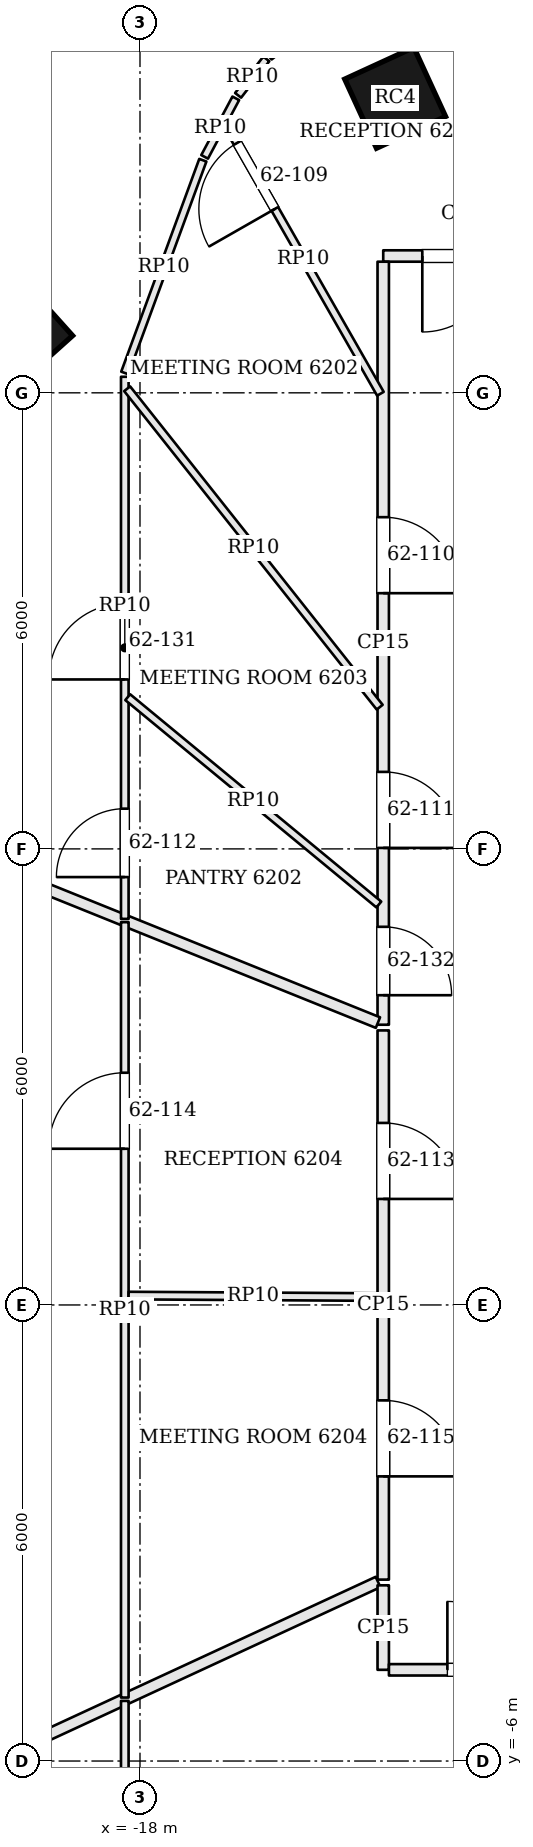
"""IFC4 building model, lengths in metres.
Left out: names, types, materials, properties, quantities, classifications, styles, units other than length and angle.
Written with IfcOpenShell. Run it as: python <this file> out.ifc"""

import sys

from ifc_helpers import new_model, si_unit, direction, frame, frame_2d, origin, origin_2d, place, context, subcontext, project, spatial, rectangle, extrude, element, fill, save


model = new_model("IFC4")
c1 = context("Model", 3, precision=1e-05, world=origin(), true_north=direction((0.0, 1.0)))
c2 = subcontext(c1, "Body", "Model", "MODEL_VIEW")
j1 = project(units=[si_unit("LENGTHUNIT", "METRE"), si_unit("PLANEANGLEUNIT", "RADIAN")], contexts=[c1])
p1 = place(None, origin())
s1 = spatial("IfcSite", under=j1, at=p1, CompositionType="ELEMENT")
p2 = place(p1, origin())
s2 = spatial("IfcBuilding", under=s1, at=p2, CompositionType="ELEMENT")
p3 = place(p2, frame((0.0, 0.0, 252.6)))
s3 = spatial("IfcBuildingStorey", under=s2, at=p3, CompositionType="ELEMENT", Elevation=252.6)
for number, where, z_axis, x_axis in (
    (1, (-14.643, 15.881, 0.0), (0.0, 0.0, 1.0), (-0.909, -0.417, 0.0)),
    (2, (-19.593, 12.79, 0.0), (0.0, 0.0, 1.0), (-0.744, -0.668, 0.0)),
):
    element("IfcColumn", number, at=place(p3, frame(where, z_axis=z_axis, x_axis=x_axis)), inside=s3, PredefinedType="COLUMN", context=c2, shape_type="SweptSolid", body=[
        extrude(rectangle(XDim=1.0, YDim=1.0, at=origin_2d()), origin(), (0.0, 0.0, 1.0), 3.9),
    ])
p4 = place(p3, frame((-18.767, 18.854, 0.0), z_axis=(0.0, 0.0, 1.0), x_axis=(-0.474475888716, -0.880268499395, 0.0)))
e3 = element("IfcWall", 3, at=p4, inside=s3, PredefinedType="SOLIDWALL", context=c2, shape_type="SweptSolid", body=[
    extrude(rectangle(XDim=4.219, YDim=0.45, at=frame_2d((2.11, 0.0))), origin(), (0.0, 0.0, 1.0), 3.7),
])
p5 = place(p4, frame((1.06, 0.0, 0.9)))
e4 = element("IfcOpeningElement", 4, at=p5, cuts=e3, PredefinedType="OPENING", context=c2, shape_type="SweptSolid", body=[
    extrude(rectangle(XDim=2.1, YDim=2.3, at=frame_2d((1.05, 1.15))), frame((0.0, 0.235, 0.0), z_axis=(0.0, -1.0, 0.0), x_axis=(1.0, 0.0, 0.0)), (0.0, 0.0, 1.0), 0.47),
])
p6 = place(p3, frame((-18.896, 18.773, 3.9), z_axis=(0.0, 0.0, 1.0), x_axis=(-0.474444905835, -0.880285198857, 0.0)))
e5 = element("IfcWall", 5, at=p6, inside=s3, PredefinedType="PARAPET", context=c2, shape_type="SweptSolid", body=[
    extrude(rectangle(XDim=4.05, YDim=0.3, at=frame_2d((2.025, 0.0))), origin(), (0.0, 0.0, 1.0), 1.1),
])
p7 = place(p3, frame((-14.976, 20.153, 0.0), z_axis=(0.0, 0.0, 1.0), x_axis=(0.361720652029, -0.932286527788, 0.0)))
e6 = element("IfcWall", 6, at=p7, inside=s3, PredefinedType="PARTITIONING", context=c2, shape_type="SweptSolid", body=[
    extrude(rectangle(XDim=6.739, YDim=0.15, at=frame_2d((3.37, 0.0))), origin(), (0.0, 0.0, 1.0), 3.084),
])
p8 = place(p3, frame((-12.586, 13.8, 0.0), z_axis=(0.0, 0.0, 1.0), x_axis=(-1.0, 0.0, 0.0)))
e7 = element("IfcWall", 7, at=p8, inside=s3, PredefinedType="PARTITIONING", context=c2, shape_type="SweptSolid", body=[
    extrude(rectangle(XDim=2.214, YDim=0.15, at=frame_2d((1.107, 0.0))), origin(), (0.0, 0.0, 1.0), 3.084),
])
p9 = place(p8, frame((0.7, 0.0, 0.0)))
e8 = element("IfcOpeningElement", 8, at=p9, cuts=e7, PredefinedType="OPENING", context=c2, shape_type="SweptSolid", body=[
    extrude(rectangle(XDim=1.0, YDim=2.1, at=frame_2d((0.5, 1.05))), frame((0.0, 0.085, 0.0), z_axis=(0.0, -1.0, 0.0), x_axis=(1.0, 0.0, 0.0)), (0.0, 0.0, 1.0), 0.17),
])
p10 = place(p3, frame((-14.8, 13.725, 0.0), z_axis=(0.0, 0.0, 1.0), x_axis=(0.0, -1.0, 0.0)))
e9 = element("IfcWall", 9, at=p10, inside=s3, PredefinedType="PARTITIONING", context=c2, shape_type="SweptSolid", body=[
    extrude(rectangle(XDim=10.038, YDim=0.15, at=frame_2d((5.019, 0.0))), origin(), (0.0, 0.0, 1.0), 3.084),
])
p11 = place(p10, frame((3.361, 0.0, 0.0)))
e10 = element("IfcOpeningElement", 10, at=p11, cuts=e9, PredefinedType="OPENING", context=c2, shape_type="SweptSolid", body=[
    extrude(rectangle(XDim=1.0, YDim=2.4, at=frame_2d((0.5, 1.2))), frame((0.0, 0.085, 0.0), z_axis=(0.0, -1.0, 0.0), x_axis=(1.0, 0.0, 0.0)), (0.0, 0.0, 1.0), 0.17),
])
p12 = place(p10, frame((6.712, 0.0, 0.0)))
e11 = element("IfcOpeningElement", 11, at=p12, cuts=e9, PredefinedType="OPENING", context=c2, shape_type="SweptSolid", body=[
    extrude(rectangle(XDim=1.0, YDim=2.4, at=frame_2d((0.5, 1.2))), frame((0.0, 0.085, 0.0), z_axis=(0.0, -1.0, 0.0), x_axis=(1.0, 0.0, 0.0)), (0.0, 0.0, 1.0), 0.17),
])
p13 = place(p10, frame((8.75, 0.0, 0.0)))
e12 = element("IfcOpeningElement", 12, at=p13, cuts=e9, PredefinedType="OPENING", context=c2, shape_type="SweptSolid", body=[
    extrude(rectangle(XDim=0.9, YDim=2.1, at=frame_2d((0.45, 1.05))), frame((0.0, 0.085, 0.0), z_axis=(0.0, -1.0, 0.0), x_axis=(1.0, 0.0, 0.0)), (0.0, 0.0, 1.0), 0.17),
])
p14 = place(p3, frame((-25.486, 7.995, 0.0), z_axis=(0.0, 0.0, 1.0), x_axis=(0.927462708684, -0.373915664289, 0.0)))
e13 = element("IfcWall", 13, at=p14, inside=s3, PredefinedType="PARTITIONING", context=c2, shape_type="SweptSolid", body=[
    extrude(rectangle(XDim=11.447, YDim=0.15, at=frame_2d((5.723, 0.0))), origin(), (0.0, 0.0, 1.0), 3.084),
])
p15 = place(p3, frame((-14.8, 3.612, 0.0), z_axis=(0.0, 0.0, 1.0), x_axis=(0.0, -1.0, 0.0)))
e14 = element("IfcWall", 14, at=p15, inside=s3, PredefinedType="PARTITIONING", context=c2, shape_type="SweptSolid", body=[
    extrude(rectangle(XDim=7.225, YDim=0.15, at=frame_2d((3.613, 0.0))), origin(), (0.0, 0.0, 1.0), 3.084),
])
p16 = place(p15, frame((1.217, 0.0, 0.0)))
e15 = element("IfcOpeningElement", 15, at=p16, cuts=e14, PredefinedType="OPENING", context=c2, shape_type="SweptSolid", body=[
    extrude(rectangle(XDim=1.0, YDim=2.1, at=frame_2d((0.5, 1.05))), frame((0.0, 0.085, 0.0), z_axis=(0.0, -1.0, 0.0), x_axis=(1.0, 0.0, 0.0)), (0.0, 0.0, 1.0), 0.17),
])
p17 = place(p15, frame((4.867, 0.0, 0.0)))
e16 = element("IfcOpeningElement", 16, at=p17, cuts=e14, PredefinedType="OPENING", context=c2, shape_type="SweptSolid", body=[
    extrude(rectangle(XDim=1.0, YDim=2.4, at=frame_2d((0.5, 1.2))), frame((0.0, 0.085, 0.0), z_axis=(0.0, -1.0, 0.0), x_axis=(1.0, 0.0, 0.0)), (0.0, 0.0, 1.0), 0.17),
])
p18 = place(p3, frame((-24.363, -8.04, 0.0), z_axis=(0.0, 0.0, 1.0), x_axis=(0.907507429398, 0.420036028916, 0.0)))
e17 = element("IfcWall", 17, at=p18, inside=s3, PredefinedType="PARTITIONING", context=c2, shape_type="SweptSolid", body=[
    extrude(rectangle(XDim=10.463, YDim=0.15, at=frame_2d((5.231, 0.0))), origin(), (0.0, 0.0, 1.0), 3.084),
])
p19 = place(p3, frame((-14.8, -3.688, 0.0), z_axis=(0.0, 0.0, 1.0), x_axis=(0.0, -1.0, 0.0)))
e18 = element("IfcWall", 18, at=p19, inside=s3, PredefinedType="PARTITIONING", context=c2, shape_type="SweptSolid", body=[
    extrude(rectangle(XDim=1.112, YDim=0.15, at=frame_2d((0.556, 0.0))), origin(), (0.0, 0.0, 1.0), 3.084),
])
p20 = place(p3, frame((-14.725, -4.8, 0.0), z_axis=(0.0, 0.0, 1.0), x_axis=(1.0, 0.0, 0.0)))
e19 = element("IfcWall", 19, at=p20, inside=s3, PredefinedType="PARTITIONING", context=c2, shape_type="SweptSolid", body=[
    extrude(rectangle(XDim=4.6, YDim=0.15, at=frame_2d((2.3, 0.0))), origin(), (0.0, 0.0, 1.0), 3.084),
])
p21 = place(p20, frame((0.769, 0.0, 0.0)))
e20 = element("IfcOpeningElement", 20, at=p21, cuts=e19, PredefinedType="OPENING", context=c2, shape_type="SweptSolid", body=[
    extrude(rectangle(XDim=1.8, YDim=2.1, at=frame_2d((0.9, 1.05))), frame((0.0, 0.085, 0.0), z_axis=(0.0, -1.0, 0.0), x_axis=(1.0, 0.0, 0.0)), (0.0, 0.0, 1.0), 0.17),
])
p22 = place(p3, frame((-14.1, -13.319, 0.0), z_axis=(0.0, 0.0, 1.0), x_axis=(0.422849635533, 0.906199859705, 0.0)))
e21 = element("IfcWall", 21, at=p22, inside=s3, PredefinedType="PARTITIONING", context=c2, shape_type="SweptSolid", body=[
    extrude(rectangle(XDim=9.326, YDim=0.15, at=frame_2d((4.663, 0.0))), origin(), (0.0, 0.0, 1.0), 3.084),
])
p23 = place(p3, frame((-18.2, 12.261, 0.0), z_axis=(0.0, 0.0, 1.0), x_axis=(0.344384562173, 0.938828670917, 0.0)))
e22 = element("IfcWall", 22, at=p23, inside=s3, PredefinedType="PARTITIONING", context=c2, shape_type="SweptSolid", body=[
    extrude(rectangle(XDim=2.982, YDim=0.1, at=frame_2d((1.491, 0.0))), origin(), (0.0, 0.0, 1.0), 3.084),
])
p24 = place(p3, frame((-17.15, 15.104, 0.0), z_axis=(0.0, 0.0, 1.0), x_axis=(0.46990536129, 0.882716801376, 0.0)))
e23 = element("IfcWall", 23, at=p24, inside=s3, PredefinedType="PARTITIONING", context=c2, shape_type="SweptSolid", body=[
    extrude(rectangle(XDim=0.872, YDim=0.1, at=frame_2d((0.436, 0.0))), origin(), (0.0, 0.0, 1.0), 3.084),
])
p25 = place(p3, frame((-16.709, 15.914, 0.0), z_axis=(0.0, 0.0, 1.0), x_axis=(0.612181321454, 0.790717414544, 0.0)))
e24 = element("IfcWall", 24, at=p25, inside=s3, PredefinedType="PARTITIONING", context=c2, shape_type="SweptSolid", body=[
    extrude(rectangle(XDim=0.606, YDim=0.1, at=frame_2d((0.303, 0.0))), origin(), (0.0, 0.0, 1.0), 3.084),
])
p26 = place(p3, frame((-16.3, 16.424, 0.0), z_axis=(0.0, 0.0, 1.0), x_axis=(0.777836101026, 0.628467182867, 0.0)))
e25 = element("IfcWall", 25, at=p26, inside=s3, PredefinedType="PARTITIONING", context=c2, shape_type="SweptSolid", body=[
    extrude(rectangle(XDim=0.48, YDim=0.1, at=frame_2d((0.24, 0.0))), origin(), (0.0, 0.0, 1.0), 3.084),
])
p27 = place(p3, frame((-18.2, 5.079, 0.0), z_axis=(0.0, 0.0, 1.0), x_axis=(0.0, 1.0, 0.0)))
e26 = element("IfcWall", 26, at=p27, inside=s3, PredefinedType="PARTITIONING", context=c2, shape_type="SweptSolid", body=[
    extrude(rectangle(XDim=7.132, YDim=0.1, at=frame_2d((3.566, 0.0))), origin(), (0.0, 0.0, 1.0), 3.084),
])
p28 = place(p27, frame((0.55, 0.0, 0.0)))
e27 = element("IfcOpeningElement", 27, at=p28, cuts=e26, PredefinedType="OPENING", context=c2, shape_type="SweptSolid", body=[
    extrude(rectangle(XDim=0.9, YDim=2.1, at=frame_2d((0.45, 1.05))), frame((0.0, 0.06, 0.0), z_axis=(0.0, -1.0, 0.0), x_axis=(1.0, 0.0, 0.0)), (0.0, 0.0, 1.0), 0.12),
])
p29 = place(p27, frame((3.15, 0.0, 0.0)))
e28 = element("IfcOpeningElement", 28, at=p29, cuts=e26, PredefinedType="OPENING", context=c2, shape_type="SweptSolid", body=[
    extrude(rectangle(XDim=1.0, YDim=2.4, at=frame_2d((0.5, 1.2))), frame((0.0, 0.06, 0.0), z_axis=(0.0, -1.0, 0.0), x_axis=(1.0, 0.0, 0.0)), (0.0, 0.0, 1.0), 0.12),
])
p30 = place(p3, frame((-14.837, 11.988, 0.0), z_axis=(0.0, 0.0, 1.0), x_axis=(-0.495920621108, 0.868367858433, 0.0)))
e29 = element("IfcWall", 29, at=p30, inside=s3, PredefinedType="PARTITIONING", context=c2, shape_type="SweptSolid", body=[
    extrude(rectangle(XDim=4.095, YDim=0.1, at=frame_2d((2.047, 0.0))), origin(), (0.0, 0.0, 1.0), 3.084),
])
p31 = place(p30, frame((2.8, 0.0, 0.0)))
e30 = element("IfcOpeningElement", 30, at=p31, cuts=e29, PredefinedType="OPENING", context=c2, shape_type="SweptSolid", body=[
    extrude(rectangle(XDim=1.0, YDim=2.4, at=frame_2d((0.5, 1.2))), frame((0.0, 0.06, 0.0), z_axis=(0.0, -1.0, 0.0), x_axis=(1.0, 0.0, 0.0)), (0.0, 0.0, 1.0), 0.12),
])
p32 = place(p3, frame((-14.847, 7.864, 0.0), z_axis=(0.0, 0.0, 1.0), x_axis=(-0.62137054643, 0.783516843488, 0.0)))
e31 = element("IfcWall", 31, at=p32, inside=s3, PredefinedType="PARTITIONING", context=c2, shape_type="SweptSolid", body=[
    extrude(rectangle(XDim=5.347, YDim=0.1, at=frame_2d((2.673, 0.0))), origin(), (0.0, 0.0, 1.0), 3.084),
])
p33 = place(p3, frame((-14.858, 5.268, 0.0), z_axis=(0.0, 0.0, 1.0), x_axis=(-0.771123538213, 0.636685549399, 0.0)))
e32 = element("IfcWall", 32, at=p33, inside=s3, PredefinedType="PARTITIONING", context=c2, shape_type="SweptSolid", body=[
    extrude(rectangle(XDim=4.284, YDim=0.1, at=frame_2d((2.142, 0.0))), origin(), (0.0, 0.0, 1.0), 3.084),
])
p34 = place(p3, frame((-18.2, -5.165, 0.0), z_axis=(0.0, 0.0, 1.0), x_axis=(0.0, 1.0, 0.0)))
e33 = element("IfcWall", 33, at=p34, inside=s3, PredefinedType="PARTITIONING", context=c2, shape_type="SweptSolid", body=[
    extrude(rectangle(XDim=10.201, YDim=0.1, at=frame_2d((5.1, 0.0))), origin(), (0.0, 0.0, 1.0), 3.084),
])
p35 = place(p34, frame((7.22, 0.0, 0.0)))
e34 = element("IfcOpeningElement", 34, at=p35, cuts=e33, PredefinedType="OPENING", context=c2, shape_type="SweptSolid", body=[
    extrude(rectangle(XDim=1.0, YDim=2.1, at=frame_2d((0.5, 1.05))), frame((0.0, 0.06, 0.0), z_axis=(0.0, -1.0, 0.0), x_axis=(1.0, 0.0, 0.0)), (0.0, 0.0, 1.0), 0.12),
])
p36 = place(p3, frame((-14.875, 0.104, 0.0), z_axis=(0.0, 0.0, 1.0), x_axis=(-0.999982216314, 0.005963812234, 0.0)))
e35 = element("IfcWall", 35, at=p36, inside=s3, PredefinedType="PARTITIONING", context=c2, shape_type="SweptSolid", body=[
    extrude(rectangle(XDim=3.275, YDim=0.1, at=frame_2d((1.637, 0.0))), origin(), (0.0, 0.0, 1.0), 3.084),
])
p37 = place(p3, frame((-18.2, -8.15, 0.0), z_axis=(0.0, 0.0, 1.0), x_axis=(0.0, 1.0, 0.0)))
e36 = element("IfcWall", 36, at=p37, inside=s3, PredefinedType="PARTITIONING", context=c2, shape_type="SweptSolid", body=[
    extrude(rectangle(XDim=2.941, YDim=0.1, at=frame_2d((1.47, 0.0))), origin(), (0.0, 0.0, 1.0), 3.084),
])
p38 = place(p9, origin())
e37 = element("IfcDoor", 37, at=p38, inside=s3, OperationType="SINGLE_SWING_RIGHT", PredefinedType="DOOR", context=c2, shape_type="SweptSolid", body=[
    extrude(rectangle(XDim=1.0, YDim=2.1, at=frame_2d((0.5, 1.05))), frame((0.0, 0.025, 0.0), z_axis=(0.0, -1.0, 0.0), x_axis=(1.0, 0.0, 0.0)), (0.0, 0.0, 1.0), 0.05),
])
fill(e8, e37)
p39 = place(p31, origin())
e38 = element("IfcDoor", 38, at=p39, inside=s3, OperationType="SINGLE_SWING_LEFT", PredefinedType="DOOR", context=c2, shape_type="SweptSolid", body=[
    extrude(rectangle(XDim=1.0, YDim=2.4, at=frame_2d((0.5, 1.2))), frame((0.0, 0.025, 0.0), z_axis=(0.0, -1.0, 0.0), x_axis=(1.0, 0.0, 0.0)), (0.0, 0.0, 1.0), 0.05),
])
fill(e30, e38)
p40 = place(p11, origin())
e39 = element("IfcDoor", 39, at=p40, inside=s3, OperationType="SINGLE_SWING_RIGHT", PredefinedType="DOOR", context=c2, shape_type="SweptSolid", body=[
    extrude(rectangle(XDim=1.0, YDim=2.4, at=frame_2d((0.5, 1.2))), frame((0.0, 0.025, 0.0), z_axis=(0.0, -1.0, 0.0), x_axis=(1.0, 0.0, 0.0)), (0.0, 0.0, 1.0), 0.05),
])
fill(e10, e39)
p41 = place(p12, origin())
e40 = element("IfcDoor", 40, at=p41, inside=s3, OperationType="SINGLE_SWING_RIGHT", PredefinedType="DOOR", context=c2, shape_type="SweptSolid", body=[
    extrude(rectangle(XDim=1.0, YDim=2.4, at=frame_2d((0.5, 1.2))), frame((0.0, 0.025, 0.0), z_axis=(0.0, -1.0, 0.0), x_axis=(1.0, 0.0, 0.0)), (0.0, 0.0, 1.0), 0.05),
])
fill(e11, e40)
p42 = place(p28, origin())
e41 = element("IfcDoor", 41, at=p42, inside=s3, OperationType="SINGLE_SWING_LEFT", PredefinedType="DOOR", context=c2, shape_type="SweptSolid", body=[
    extrude(rectangle(XDim=0.9, YDim=2.1, at=frame_2d((0.45, 1.05))), frame((0.0, 0.025, 0.0), z_axis=(0.0, -1.0, 0.0), x_axis=(1.0, 0.0, 0.0)), (0.0, 0.0, 1.0), 0.05),
])
fill(e27, e41)
p43 = place(p16, origin())
e42 = element("IfcDoor", 42, at=p43, inside=s3, OperationType="SINGLE_SWING_RIGHT", PredefinedType="DOOR", context=c2, shape_type="SweptSolid", body=[
    extrude(rectangle(XDim=1.0, YDim=2.1, at=frame_2d((0.5, 1.05))), frame((0.0, 0.025, 0.0), z_axis=(0.0, -1.0, 0.0), x_axis=(1.0, 0.0, 0.0)), (0.0, 0.0, 1.0), 0.05),
])
fill(e15, e42)
p44 = place(p35, origin())
e43 = element("IfcDoor", 43, at=p44, inside=s3, OperationType="SINGLE_SWING_LEFT", PredefinedType="DOOR", context=c2, shape_type="SweptSolid", body=[
    extrude(rectangle(XDim=1.0, YDim=2.1, at=frame_2d((0.5, 1.05))), frame((0.0, 0.025, 0.0), z_axis=(0.0, -1.0, 0.0), x_axis=(1.0, 0.0, 0.0)), (0.0, 0.0, 1.0), 0.05),
])
fill(e34, e43)
p45 = place(p17, origin())
e44 = element("IfcDoor", 44, at=p45, inside=s3, OperationType="SINGLE_SWING_RIGHT", PredefinedType="DOOR", context=c2, shape_type="SweptSolid", body=[
    extrude(rectangle(XDim=1.0, YDim=2.4, at=frame_2d((0.5, 1.2))), frame((0.0, 0.025, 0.0), z_axis=(0.0, -1.0, 0.0), x_axis=(1.0, 0.0, 0.0)), (0.0, 0.0, 1.0), 0.05),
])
fill(e16, e44)
p46 = place(p21, origin())
e45 = element("IfcDoor", 45, at=p46, inside=s3, OperationType="DOUBLE_DOOR_SINGLE_SWING", PredefinedType="DOOR", context=c2, shape_type="SweptSolid", body=[
    extrude(rectangle(XDim=1.8, YDim=2.1, at=frame_2d((0.9, 1.05))), frame((0.0, 0.025, 0.0), z_axis=(0.0, -1.0, 0.0), x_axis=(1.0, 0.0, 0.0)), (0.0, 0.0, 1.0), 0.05),
])
fill(e20, e45)
p47 = place(p29, origin())
e46 = element("IfcDoor", 46, at=p47, inside=s3, OperationType="SINGLE_SWING_LEFT", PredefinedType="DOOR", context=c2, shape_type="SweptSolid", body=[
    extrude(rectangle(XDim=1.0, YDim=2.4, at=frame_2d((0.5, 1.2))), frame((0.0, 0.025, 0.0), z_axis=(0.0, -1.0, 0.0), x_axis=(1.0, 0.0, 0.0)), (0.0, 0.0, 1.0), 0.05),
])
fill(e28, e46)
p48 = place(p13, origin())
e47 = element("IfcDoor", 47, at=p48, inside=s3, OperationType="SINGLE_SWING_RIGHT", PredefinedType="DOOR", context=c2, shape_type="SweptSolid", body=[
    extrude(rectangle(XDim=0.9, YDim=2.1, at=frame_2d((0.45, 1.05))), frame((0.0, 0.025, 0.0), z_axis=(0.0, -1.0, 0.0), x_axis=(1.0, 0.0, 0.0)), (0.0, 0.0, 1.0), 0.05),
])
fill(e12, e47)
save(model, sys.argv[1])
